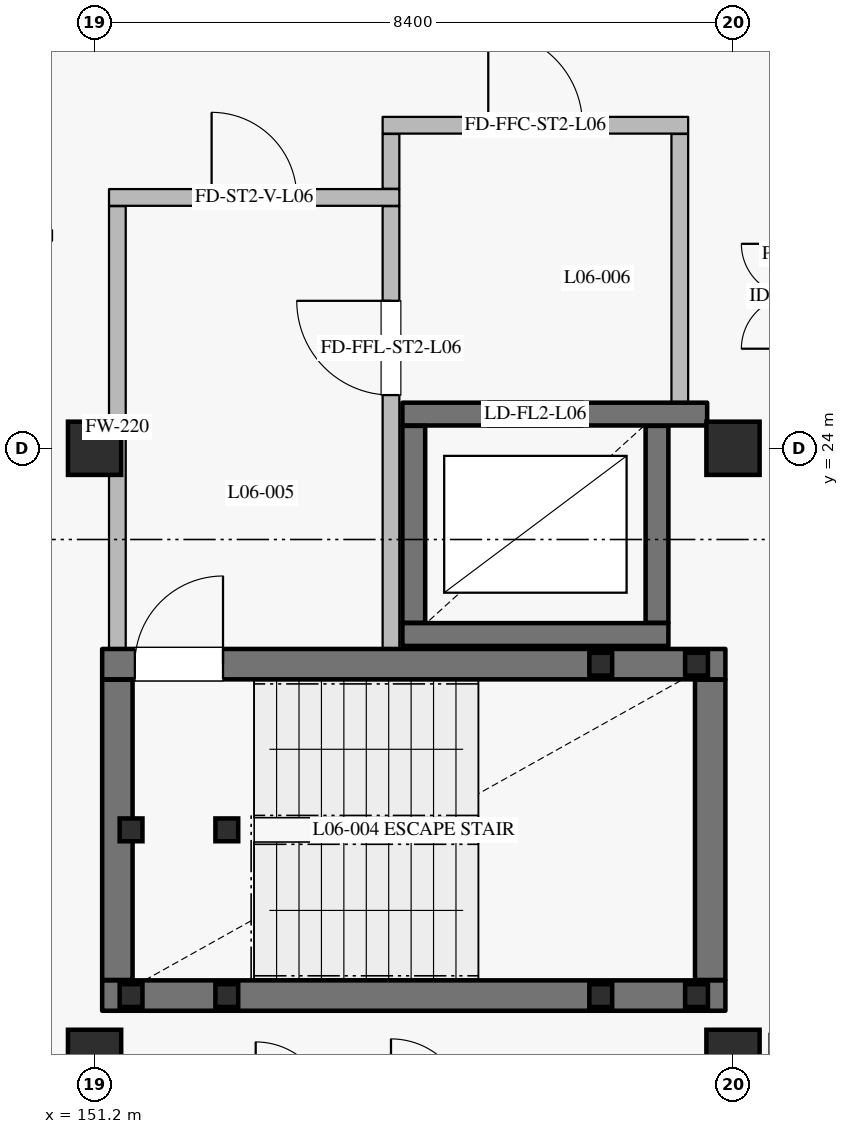
"""IFC4 building model, lengths in metres.
Left out: names, types, materials, properties, quantities, classifications, styles, units other than length and angle.
Written with IfcOpenShell. Run it as: python <this file> out.ifc"""

import sys

from ifc_helpers import new_model, si_unit, direction, frame, frame_2d, origin, origin_2d, place, context, subcontext, project, spatial, rectangle, hollow_rectangle, extrude, element, fill, save


model = new_model("IFC4")
c1 = context("Model", 3, precision=1e-05, world=origin(), true_north=direction((0.0, 1.0)))
c2 = subcontext(c1, "Body", "Model", "MODEL_VIEW")
j1 = project(units=[si_unit("LENGTHUNIT", "METRE"), si_unit("PLANEANGLEUNIT", "RADIAN")], contexts=[c1])
p1 = place(None, origin())
s1 = spatial("IfcSite", under=j1, at=p1, CompositionType="ELEMENT")
p2 = place(p1, origin())
s2 = spatial("IfcBuilding", under=s1, at=p2, CompositionType="ELEMENT")
p3 = place(p2, frame((0.0, 0.0, 28.8)))
s3 = spatial("IfcBuildingStorey", under=s2, at=p3, CompositionType="ELEMENT", Elevation=28.8)
for number, where, z_axis, x_axis in (
    (1, (151.2, 24.0, 0.0), (0.0, 0.0, 1.0), (1.0, 0.0, 0.0)),
    (2, (159.6, 24.0, 0.0), (0.0, 0.0, 1.0), (1.0, 0.0, 0.0)),
    (3, (151.2, 16.0, 0.0), (0.0, 0.0, 1.0), (1.0, 0.0, 0.0)),
    (4, (159.6, 16.0, 0.0), (0.0, 0.0, 1.0), (1.0, 0.0, 0.0)),
):
    element("IfcColumn", number, at=place(p3, frame(where, z_axis=z_axis, x_axis=x_axis)), inside=s3, PredefinedType="COLUMN", context=c2, shape_type="SweptSolid", body=[
        extrude(rectangle(XDim=0.7, YDim=0.7, at=origin_2d()), origin(), (0.0, 0.0, 1.0), 3.6),
    ])
p4 = place(p3, frame((155.25, 21.55, 0.0), z_axis=(0.0, 0.0, 1.0), x_axis=(1.0, 0.0, 0.0)))
e5 = element("IfcWall", 5, at=p4, inside=s3, PredefinedType="SHEAR", context=c2, shape_type="SweptSolid", body=[
    extrude(rectangle(XDim=3.5, YDim=0.3, at=frame_2d((1.75, 0.0))), origin(), (0.0, 0.0, 1.0), 3.365),
])
p5 = place(p3, frame((158.6, 21.705, 0.0), z_axis=(0.0, 0.0, 1.0), x_axis=(0.0, 1.0, 0.0)))
e6 = element("IfcWall", 6, at=p5, inside=s3, PredefinedType="SHEAR", context=c2, shape_type="SweptSolid", body=[
    extrude(rectangle(XDim=2.59, YDim=0.3, at=frame_2d((1.295, 0.0))), origin(), (0.0, 0.0, 1.0), 3.365),
])
p6 = place(p3, frame((159.26, 24.45, 0.0), z_axis=(0.0, 0.0, 1.0), x_axis=(-1.0, 0.0, 0.0)))
e7 = element("IfcWall", 7, at=p6, inside=s3, PredefinedType="SHEAR", context=c2, shape_type="SweptSolid", body=[
    extrude(rectangle(XDim=4.01, YDim=0.3, at=frame_2d((2.005, 0.0))), origin(), (0.0, 0.0, 1.0), 3.365),
])
p7 = place(p6, frame((1.635, 0.0, 0.0)))
e8 = element("IfcOpeningElement", 8, at=p7, cuts=e7, PredefinedType="OPENING", context=c2, shape_type="SweptSolid", body=[
    extrude(rectangle(XDim=1.25, YDim=2.25, at=frame_2d((0.625, 1.125))), frame((0.0, 0.16, 0.0), z_axis=(0.0, -1.0, 0.0), x_axis=(1.0, 0.0, 0.0)), (0.0, 0.0, 1.0), 0.32),
])
p8 = place(p3, frame((155.4, 24.295, 0.0), z_axis=(0.0, 0.0, 1.0), x_axis=(0.0, -1.0, 0.0)))
e9 = element("IfcWall", 9, at=p8, inside=s3, PredefinedType="SHEAR", context=c2, shape_type="SweptSolid", body=[
    extrude(rectangle(XDim=2.59, YDim=0.3, at=frame_2d((1.295, 0.0))), origin(), (0.0, 0.0, 1.0), 3.365),
])
p9 = place(p3, frame((151.3, 16.8, 0.0), z_axis=(0.0, 0.0, 1.0), x_axis=(1.0, 0.0, 0.0)))
e10 = element("IfcWall", 10, at=p9, inside=s3, PredefinedType="SHEAR", context=c2, shape_type="SweptSolid", body=[
    extrude(rectangle(XDim=8.2, YDim=0.4, at=frame_2d((4.1, 0.0))), origin(), (0.0, 0.0, 1.0), 3.365),
])
p10 = place(p3, frame((159.3, 17.005, 0.0), z_axis=(0.0, 0.0, 1.0), x_axis=(0.0, 1.0, 0.0)))
e11 = element("IfcWall", 11, at=p10, inside=s3, PredefinedType="SHEAR", context=c2, shape_type="SweptSolid", body=[
    extrude(rectangle(XDim=3.95, YDim=0.4, at=frame_2d((1.975, 0.0))), origin(), (0.0, 0.0, 1.0), 3.365),
])
p11 = place(p3, frame((151.3, 21.16, 0.0), z_axis=(0.0, 0.0, 1.0), x_axis=(1.0, 0.0, 0.0)))
e12 = element("IfcWall", 12, at=p11, inside=s3, PredefinedType="SHEAR", context=c2, shape_type="SweptSolid", body=[
    extrude(rectangle(XDim=8.2, YDim=0.4, at=frame_2d((4.1, 0.0))), origin(), (0.0, 0.0, 1.0), 3.365),
])
p12 = place(p11, frame((0.43, 0.0, 0.0)))
e13 = element("IfcOpeningElement", 13, at=p12, cuts=e12, PredefinedType="OPENING", context=c2, shape_type="SweptSolid", body=[
    extrude(rectangle(XDim=1.16, YDim=2.2, at=frame_2d((0.58, 1.1))), frame((0.0, 0.21, 0.0), z_axis=(0.0, -1.0, 0.0), x_axis=(1.0, 0.0, 0.0)), (0.0, 0.0, 1.0), 0.42),
])
p13 = place(p3, frame((151.5, 17.005, 0.0), z_axis=(0.0, 0.0, 1.0), x_axis=(0.0, 1.0, 0.0)))
e14 = element("IfcWall", 14, at=p13, inside=s3, PredefinedType="SHEAR", context=c2, shape_type="SweptSolid", body=[
    extrude(rectangle(XDim=3.95, YDim=0.4, at=frame_2d((1.975, 0.0))), origin(), (0.0, 0.0, 1.0), 3.365),
])
p14 = place(p3, frame((151.5, 21.365, 0.0), z_axis=(0.0, 0.0, 1.0), x_axis=(0.0, 1.0, 0.0)))
e15 = element("IfcWall", 15, at=p14, inside=s3, PredefinedType="PARTITIONING", context=c2, shape_type="SweptSolid", body=[
    extrude(rectangle(XDim=5.82, YDim=0.22, at=frame_2d((2.91, 0.0))), origin(), (0.0, 0.0, 1.0), 3.365),
])
p15 = place(p3, frame((151.39, 27.3, 0.0), z_axis=(0.0, 0.0, 1.0), x_axis=(1.0, 0.0, 0.0)))
e16 = element("IfcWall", 16, at=p15, inside=s3, PredefinedType="PARTITIONING", context=c2, shape_type="SweptSolid", body=[
    extrude(rectangle(XDim=3.82, YDim=0.22, at=frame_2d((1.91, 0.0))), origin(), (0.0, 0.0, 1.0), 3.365),
])
p16 = place(p15, frame((1.35, 0.0, 0.0)))
e17 = element("IfcOpeningElement", 17, at=p16, cuts=e16, PredefinedType="OPENING", context=c2, shape_type="SweptSolid", body=[
    extrude(rectangle(XDim=1.12, YDim=2.2, at=frame_2d((0.56, 1.1))), frame((0.0, 0.12, 0.0), z_axis=(0.0, -1.0, 0.0), x_axis=(1.0, 0.0, 0.0)), (0.0, 0.0, 1.0), 0.24),
])
p17 = place(p3, frame((155.1, 21.365, 0.0), z_axis=(0.0, 0.0, 1.0), x_axis=(0.0, 1.0, 0.0)))
e18 = element("IfcWall", 18, at=p17, inside=s3, PredefinedType="PARTITIONING", context=c2, shape_type="SweptSolid", body=[
    extrude(rectangle(XDim=5.82, YDim=0.22, at=frame_2d((2.91, 0.0))), origin(), (0.0, 0.0, 1.0), 3.365),
])
p18 = place(p17, frame((3.335, 0.0, 0.0)))
e19 = element("IfcOpeningElement", 19, at=p18, cuts=e18, PredefinedType="OPENING", context=c2, shape_type="SweptSolid", body=[
    extrude(rectangle(XDim=1.24, YDim=2.2, at=frame_2d((0.62, 1.1))), frame((0.0, 0.12, 0.0), z_axis=(0.0, -1.0, 0.0), x_axis=(1.0, 0.0, 0.0)), (0.0, 0.0, 1.0), 0.24),
])
p19 = place(p3, frame((155.1, 27.415, 0.0), z_axis=(0.0, 0.0, 1.0), x_axis=(0.0, 1.0, 0.0)))
e20 = element("IfcWall", 20, at=p19, inside=s3, PredefinedType="PARTITIONING", context=c2, shape_type="SweptSolid", body=[
    extrude(rectangle(XDim=0.72, YDim=0.22, at=frame_2d((0.36, 0.0))), origin(), (0.0, 0.0, 1.0), 3.365),
])
p20 = place(p3, frame((158.9, 24.605, 0.0), z_axis=(0.0, 0.0, 1.0), x_axis=(0.0, 1.0, 0.0)))
e21 = element("IfcWall", 21, at=p20, inside=s3, PredefinedType="PARTITIONING", context=c2, shape_type="SweptSolid", body=[
    extrude(rectangle(XDim=3.53, YDim=0.22, at=frame_2d((1.765, 0.0))), origin(), (0.0, 0.0, 1.0), 3.365),
])
p21 = place(p3, frame((154.99, 28.25, 0.0), z_axis=(0.0, 0.0, 1.0), x_axis=(1.0, 0.0, 0.0)))
e22 = element("IfcWall", 22, at=p21, inside=s3, PredefinedType="PARTITIONING", context=c2, shape_type="SweptSolid", body=[
    extrude(rectangle(XDim=4.02, YDim=0.22, at=frame_2d((2.01, 0.0))), origin(), (0.0, 0.0, 1.0), 3.365),
])
p22 = place(p21, frame((1.39, 0.0, 0.0)))
e23 = element("IfcOpeningElement", 23, at=p22, cuts=e22, PredefinedType="OPENING", context=c2, shape_type="SweptSolid", body=[
    extrude(rectangle(XDim=1.24, YDim=2.2, at=frame_2d((0.62, 1.1))), frame((0.0, 0.12, 0.0), z_axis=(0.0, -1.0, 0.0), x_axis=(1.0, 0.0, 0.0)), (0.0, 0.0, 1.0), 0.24),
])
for number, where, z_axis, x_axis in (
    (24, (151.68, 16.8, 0.0), (0.0, 0.0, 1.0), (1.0, 0.0, 0.0)),
    (25, (151.68, 18.98, 0.0), (0.0, 0.0, 1.0), (1.0, 0.0, 0.0)),
    (26, (152.94, 16.8, 0.0), (0.0, 0.0, 1.0), (1.0, 0.0, 0.0)),
    (27, (152.94, 18.98, 0.0), (0.0, 0.0, 1.0), (1.0, 0.0, 0.0)),
    (28, (157.86, 16.8, -1.8), (0.0, 0.0, 1.0), (1.0, 0.0, 0.0)),
    (29, (157.86, 21.16, -1.8), (0.0, 0.0, 1.0), (1.0, 0.0, 0.0)),
    (30, (159.12, 16.8, -1.8), (0.0, 0.0, 1.0), (1.0, 0.0, 0.0)),
    (31, (159.12, 21.16, -1.8), (0.0, 0.0, 1.0), (1.0, 0.0, 0.0)),
):
    element("IfcColumn", number, at=place(p3, frame(where, z_axis=z_axis, x_axis=x_axis)), inside=s3, PredefinedType="COLUMN", context=c2, shape_type="SweptSolid", body=[
        extrude(hollow_rectangle(XDim=0.3, YDim=0.3, WallThickness=0.012, at=origin_2d()), origin(), (0.0, 0.0, 1.0), 3.42),
    ])
p23 = place(p7, origin())
e32 = element("IfcDoor", 32, at=p23, inside=s3, OperationType="DOUBLE_DOOR_SLIDING", PredefinedType="DOOR", context=c2, shape_type="SweptSolid", body=[
    extrude(rectangle(XDim=1.25, YDim=2.25, at=frame_2d((0.625, 1.125))), frame((0.0, 0.025, 0.0), z_axis=(0.0, -1.0, 0.0), x_axis=(1.0, 0.0, 0.0)), (0.0, 0.0, 1.0), 0.05),
])
fill(e8, e32)
p24 = place(p12, origin())
e33 = element("IfcDoor", 33, at=p24, inside=s3, OperationType="SINGLE_SWING_RIGHT", PredefinedType="DOOR", context=c2, shape_type="SweptSolid", body=[
    extrude(rectangle(XDim=1.16, YDim=2.2, at=frame_2d((0.58, 1.1))), frame((0.0, 0.025, 0.0), z_axis=(0.0, -1.0, 0.0), x_axis=(1.0, 0.0, 0.0)), (0.0, 0.0, 1.0), 0.05),
])
fill(e13, e33)
p25 = place(p16, origin())
e34 = element("IfcDoor", 34, at=p25, inside=s3, OperationType="SINGLE_SWING_LEFT", PredefinedType="DOOR", context=c2, shape_type="SweptSolid", body=[
    extrude(rectangle(XDim=1.12, YDim=2.2, at=frame_2d((0.56, 1.1))), frame((0.0, 0.025, 0.0), z_axis=(0.0, -1.0, 0.0), x_axis=(1.0, 0.0, 0.0)), (0.0, 0.0, 1.0), 0.05),
])
fill(e17, e34)
p26 = place(p18, origin())
e35 = element("IfcDoor", 35, at=p26, inside=s3, OperationType="SINGLE_SWING_RIGHT", PredefinedType="DOOR", context=c2, shape_type="SweptSolid", body=[
    extrude(rectangle(XDim=1.24, YDim=2.2, at=frame_2d((0.62, 1.1))), frame((0.0, 0.025, 0.0), z_axis=(0.0, -1.0, 0.0), x_axis=(1.0, 0.0, 0.0)), (0.0, 0.0, 1.0), 0.05),
])
fill(e19, e35)
p27 = place(p22, origin())
e36 = element("IfcDoor", 36, at=p27, inside=s3, OperationType="SINGLE_SWING_LEFT", PredefinedType="DOOR", context=c2, shape_type="SweptSolid", body=[
    extrude(rectangle(XDim=1.24, YDim=2.2, at=frame_2d((0.62, 1.1))), frame((0.0, 0.025, 0.0), z_axis=(0.0, -1.0, 0.0), x_axis=(1.0, 0.0, 0.0)), (0.0, 0.0, 1.0), 0.05),
])
fill(e23, e36)
save(model, sys.argv[1])
